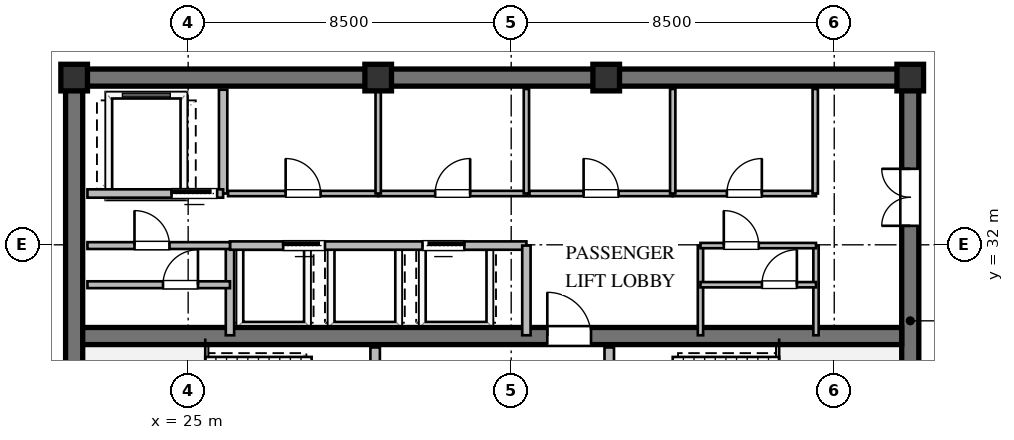
"""IFC4 building model, lengths in metres.
Left out: names, types, materials, properties, quantities, classifications, styles, units other than length and angle.
Written with IfcOpenShell. Run it as: python <this file> out.ifc"""

import sys

from ifc_helpers import new_model, si_unit, direction, frame, frame_2d, origin, origin_2d, place, context, subcontext, project, spatial, rectangle, extrude, element, fill, save


model = new_model("IFC4")
c1 = context("Model", 3, precision=1e-05, world=origin(), true_north=direction((0.0, 1.0)))
c2 = subcontext(c1, "Body", "Model", "MODEL_VIEW")
j1 = project(units=[si_unit("LENGTHUNIT", "METRE"), si_unit("PLANEANGLEUNIT", "RADIAN")], contexts=[c1])
p1 = place(None, origin())
s1 = spatial("IfcSite", under=j1, at=p1, CompositionType="ELEMENT")
p2 = place(p1, origin())
s2 = spatial("IfcBuilding", under=s1, at=p2, CompositionType="ELEMENT")
p3 = place(p2, frame((0.0, 0.0, 266.2)))
s3 = spatial("IfcBuildingStorey", under=s2, at=p3, CompositionType="ELEMENT", Elevation=266.2)
p4 = place(p3, frame((21.775, 36.4, 0.0), z_axis=(0.0, 0.0, 1.0), x_axis=(1.0, 0.0, 0.0)))
e1 = element("IfcWall", 1, at=p4, inside=s3, PredefinedType="SHEAR", context=c2, shape_type="SweptSolid", body=[
    extrude(rectangle(XDim=22.45, YDim=0.45, at=frame_2d((11.225, 0.0))), origin(), (0.0, 0.0, 1.0), 3.56),
])
p5 = place(p3, frame((22.0, 23.825, 0.0), z_axis=(0.0, 0.0, 1.0), x_axis=(0.0, 1.0, 0.0)))
e2 = element("IfcWall", 2, at=p5, inside=s3, PredefinedType="SHEAR", context=c2, shape_type="SweptSolid", body=[
    extrude(rectangle(XDim=12.35, YDim=0.45, at=frame_2d((6.175, 0.0))), origin(), (0.0, 0.0, 1.0), 3.56),
])
p6 = place(p3, frame((44.0, 23.825, 0.0), z_axis=(0.0, 0.0, 1.0), x_axis=(0.0, 1.0, 0.0)))
e3 = element("IfcWall", 3, at=p6, inside=s3, PredefinedType="SHEAR", context=c2, shape_type="SweptSolid", body=[
    extrude(rectangle(XDim=12.35, YDim=0.45, at=frame_2d((6.175, 0.0))), origin(), (0.0, 0.0, 1.0), 3.56),
])
p7 = place(p6, frame((8.675, 0.0, 0.0)))
e4 = element("IfcOpeningElement", 4, at=p7, cuts=e3, PredefinedType="OPENING", context=c2, shape_type="SweptSolid", body=[
    extrude(rectangle(XDim=1.5, YDim=2.15, at=frame_2d((0.75, 1.075))), frame((0.0, 0.235, 0.0), z_axis=(0.0, -1.0, 0.0), x_axis=(1.0, 0.0, 0.0)), (0.0, 0.0, 1.0), 0.47),
])
p8 = place(p3, frame((22.225, 29.6, 0.0), z_axis=(0.0, 0.0, 1.0), x_axis=(1.0, 0.0, 0.0)))
e5 = element("IfcWall", 5, at=p8, inside=s3, PredefinedType="SHEAR", context=c2, shape_type="SweptSolid", body=[
    extrude(rectangle(XDim=21.55, YDim=0.45, at=frame_2d((10.775, 0.0))), origin(), (0.0, 0.0, 1.0), 3.56),
])
p9 = place(p8, frame((12.225, 0.0, 0.0)))
e6 = element("IfcOpeningElement", 6, at=p9, cuts=e5, PredefinedType="OPENING", context=c2, shape_type="SweptSolid", body=[
    extrude(rectangle(XDim=1.15, YDim=2.1, at=frame_2d((0.575, 1.05))), frame((0.0, 0.235, 0.0), z_axis=(0.0, -1.0, 0.0), x_axis=(1.0, 0.0, 0.0)), (0.0, 0.0, 1.0), 0.47),
])
for number, where, z_axis, x_axis in (
    (7, (44.0, 36.4, 0.0), (0.0, 0.0, 1.0), (1.0, 0.0, 0.0)),
    (8, (36.0, 36.4, 0.0), (0.0, 0.0, 1.0), (1.0, 0.0, 0.0)),
    (9, (30.0, 36.4, 0.0), (0.0, 0.0, 1.0), (1.0, 0.0, 0.0)),
    (10, (22.0, 36.4, 0.0), (0.0, 0.0, 1.0), (1.0, 0.0, 0.0)),
):
    element("IfcColumn", number, at=place(p3, frame(where, z_axis=z_axis, x_axis=x_axis)), inside=s3, PredefinedType="COLUMN", context=c2, shape_type="SweptSolid", body=[
        extrude(rectangle(XDim=0.7, YDim=0.7, at=origin_2d()), origin(), (0.0, 0.0, 1.0), 3.8),
    ])
p10 = place(p3, frame((29.92, 23.9, 0.0), z_axis=(0.0, 0.0, 1.0), x_axis=(0.0, 1.0, 0.0)))
e11 = element("IfcWall", 11, at=p10, inside=s3, PredefinedType="SOLIDWALL", context=c2, shape_type="SweptSolid", body=[
    extrude(rectangle(XDim=5.4, YDim=0.25, at=frame_2d((2.7, 0.0))), origin(), (0.0, 0.0, 1.0), 3.006),
])
p11 = place(p10, frame((3.421, 0.0, 0.0)))
e12 = element("IfcOpeningElement", 12, at=p11, cuts=e11, PredefinedType="OPENING", context=c2, shape_type="SweptSolid", body=[
    extrude(rectangle(XDim=1.15, YDim=2.1, at=frame_2d((0.575, 1.05))), frame((0.0, 0.135, 0.0), z_axis=(0.0, -1.0, 0.0), x_axis=(1.0, 0.0, 0.0)), (0.0, 0.0, 1.0), 0.27),
])
p12 = place(p3, frame((36.08, 23.9, 0.0), z_axis=(0.0, 0.0, 1.0), x_axis=(0.0, 1.0, 0.0)))
e13 = element("IfcWall", 13, at=p12, inside=s3, PredefinedType="SOLIDWALL", context=c2, shape_type="SweptSolid", body=[
    extrude(rectangle(XDim=5.4, YDim=0.25, at=frame_2d((2.7, 0.0))), origin(), (0.0, 0.0, 1.0), 3.56),
])
p13 = place(p12, frame((3.421, 0.0, 0.0)))
e14 = element("IfcOpeningElement", 14, at=p13, cuts=e13, PredefinedType="OPENING", context=c2, shape_type="SweptSolid", body=[
    extrude(rectangle(XDim=1.15, YDim=2.1, at=frame_2d((0.575, 1.05))), frame((0.0, 0.135, 0.0), z_axis=(0.0, -1.0, 0.0), x_axis=(1.0, 0.0, 0.0)), (0.0, 0.0, 1.0), 0.27),
])
p14 = place(p3, frame((25.92, 33.35, 0.0), z_axis=(0.0, 0.0, 1.0), x_axis=(0.0, 1.0, 0.0)))
e15 = element("IfcWall", 15, at=p14, inside=s3, PredefinedType="SOLIDWALL", context=c2, shape_type="SweptSolid", body=[
    extrude(rectangle(XDim=2.73, YDim=0.22, at=frame_2d((1.365, 0.0))), origin(), (0.0, 0.0, 1.0), 3.56),
])
p15 = place(p3, frame((22.35, 33.35, 0.0), z_axis=(0.0, 0.0, 1.0), x_axis=(1.0, 0.0, 0.0)))
e16 = element("IfcWall", 16, at=p15, inside=s3, PredefinedType="SOLIDWALL", context=c2, shape_type="SweptSolid", body=[
    extrude(rectangle(XDim=3.57, YDim=0.22, at=frame_2d((1.785, 0.0))), origin(), (0.0, 0.0, 1.0), 3.56),
])
p16 = place(p15, frame((2.213, 0.0, 0.0)))
e17 = element("IfcOpeningElement", 17, at=p16, cuts=e16, PredefinedType="OPENING", context=c2, shape_type="SweptSolid", body=[
    extrude(rectangle(XDim=1.2, YDim=2.1, at=frame_2d((0.6, 1.05))), frame((0.0, 0.12, 0.0), z_axis=(0.0, -1.0, 0.0), x_axis=(1.0, 0.0, 0.0)), (0.0, 0.0, 1.0), 0.24),
])
p17 = place(p3, frame((26.1, 29.62, 0.0), z_axis=(0.0, 0.0, 1.0), x_axis=(0.0, 1.0, 0.0)))
e18 = element("IfcWall", 18, at=p17, inside=s3, PredefinedType="SOLIDWALL", context=c2, shape_type="SweptSolid", body=[
    extrude(rectangle(XDim=2.36, YDim=0.22, at=frame_2d((1.18, 0.0))), origin(), (0.0, 0.0, 1.0), 3.56),
])
p18 = place(p3, frame((26.1, 31.98, 0.0), z_axis=(0.0, 0.0, 1.0), x_axis=(1.0, 0.0, 0.0)))
e19 = element("IfcWall", 19, at=p18, inside=s3, PredefinedType="SOLIDWALL", context=c2, shape_type="SweptSolid", body=[
    extrude(rectangle(XDim=7.8, YDim=0.22, at=frame_2d((3.9, 0.0))), origin(), (0.0, 0.0, 1.0), 3.56),
])
p19 = place(p18, frame((1.4, 0.0, 0.0)))
e20 = element("IfcOpeningElement", 20, at=p19, cuts=e19, PredefinedType="OPENING", context=c2, shape_type="SweptSolid", body=[
    extrude(rectangle(XDim=1.1, YDim=2.1, at=frame_2d((0.55, 1.05))), frame((0.0, 0.12, 0.0), z_axis=(0.0, -1.0, 0.0), x_axis=(1.0, 0.0, 0.0)), (0.0, 0.0, 1.0), 0.24),
])
p20 = place(p18, frame((5.066, 0.0, 0.0)))
e21 = element("IfcOpeningElement", 21, at=p20, cuts=e19, PredefinedType="OPENING", context=c2, shape_type="SweptSolid", body=[
    extrude(rectangle(XDim=1.1, YDim=2.1, at=frame_2d((0.55, 1.05))), frame((0.0, 0.12, 0.0), z_axis=(0.0, -1.0, 0.0), x_axis=(1.0, 0.0, 0.0)), (0.0, 0.0, 1.0), 0.24),
])
p21 = place(p3, frame((33.9, 29.62, 0.0), z_axis=(0.0, 0.0, 1.0), x_axis=(0.0, 1.0, 0.0)))
e22 = element("IfcWall", 22, at=p21, inside=s3, PredefinedType="SOLIDWALL", context=c2, shape_type="SweptSolid", body=[
    extrude(rectangle(XDim=2.36, YDim=0.22, at=frame_2d((1.18, 0.0))), origin(), (0.0, 0.0, 1.0), 3.56),
])
p22 = place(p3, frame((26.05, 33.35, 0.0), z_axis=(0.0, 0.0, 1.0), x_axis=(1.0, 0.0, 0.0)))
e23 = element("IfcWall", 23, at=p22, inside=s3, PredefinedType="PARTITIONING", context=c2, shape_type="SweptSolid", body=[
    extrude(rectangle(XDim=3.95, YDim=0.14, at=frame_2d((1.975, 0.0))), origin(), (0.0, 0.0, 1.0), 3.56),
])
p23 = place(p22, frame((1.515, 0.0, 0.0)))
e24 = element("IfcOpeningElement", 24, at=p23, cuts=e23, PredefinedType="OPENING", context=c2, shape_type="SweptSolid", body=[
    extrude(rectangle(XDim=0.92, YDim=2.1, at=frame_2d((0.46, 1.05))), frame((0.0, 0.08, 0.0), z_axis=(0.0, -1.0, 0.0), x_axis=(1.0, 0.0, 0.0)), (0.0, 0.0, 1.0), 0.16),
])
p24 = place(p3, frame((30.0, 33.35, 0.0), z_axis=(0.0, 0.0, 1.0), x_axis=(1.0, 0.0, 0.0)))
e25 = element("IfcWall", 25, at=p24, inside=s3, PredefinedType="PARTITIONING", context=c2, shape_type="SweptSolid", body=[
    extrude(rectangle(XDim=3.92, YDim=0.14, at=frame_2d((1.96, 0.0))), origin(), (0.0, 0.0, 1.0), 3.56),
])
p25 = place(p24, frame((1.5, 0.0, 0.0)))
e26 = element("IfcOpeningElement", 26, at=p25, cuts=e25, PredefinedType="OPENING", context=c2, shape_type="SweptSolid", body=[
    extrude(rectangle(XDim=0.92, YDim=2.1, at=frame_2d((0.46, 1.05))), frame((0.0, 0.08, 0.0), z_axis=(0.0, -1.0, 0.0), x_axis=(1.0, 0.0, 0.0)), (0.0, 0.0, 1.0), 0.16),
])
for number, where, z_axis, x_axis in (
    (27, (30.0, 33.35, 0.0), (0.0, 0.0, 1.0), (0.0, 1.0, 0.0)),
    (28, (33.9, 33.35, 0.0), (0.0, 0.0, 1.0), (0.0, 1.0, 0.0)),
):
    element("IfcWall", number, at=place(p3, frame(where, z_axis=z_axis, x_axis=x_axis)), inside=s3, PredefinedType="PARTITIONING", context=c2, shape_type="SweptSolid", body=[
        extrude(rectangle(XDim=2.75, YDim=0.14, at=frame_2d((1.375, 0.0))), origin(), (0.0, 0.0, 1.0), 3.56),
    ])
p26 = place(p3, frame((33.98, 33.35, 0.0), z_axis=(0.0, 0.0, 1.0), x_axis=(1.0, 0.0, 0.0)))
e29 = element("IfcWall", 29, at=p26, inside=s3, PredefinedType="PARTITIONING", context=c2, shape_type="SweptSolid", body=[
    extrude(rectangle(XDim=3.77, YDim=0.14, at=frame_2d((1.885, 0.0))), origin(), (0.0, 0.0, 1.0), 3.56),
])
p27 = place(p26, frame((1.425, 0.0, 0.0)))
e30 = element("IfcOpeningElement", 30, at=p27, cuts=e29, PredefinedType="OPENING", context=c2, shape_type="SweptSolid", body=[
    extrude(rectangle(XDim=0.92, YDim=2.1, at=frame_2d((0.46, 1.05))), frame((0.0, 0.08, 0.0), z_axis=(0.0, -1.0, 0.0), x_axis=(1.0, 0.0, 0.0)), (0.0, 0.0, 1.0), 0.16),
])
p28 = place(p3, frame((37.75, 33.35, 0.0), z_axis=(0.0, 0.0, 1.0), x_axis=(1.0, 0.0, 0.0)))
e31 = element("IfcWall", 31, at=p28, inside=s3, PredefinedType="PARTITIONING", context=c2, shape_type="SweptSolid", body=[
    extrude(rectangle(XDim=3.77, YDim=0.14, at=frame_2d((1.885, 0.0))), origin(), (0.0, 0.0, 1.0), 3.56),
])
p29 = place(p28, frame((1.425, 0.0, 0.0)))
e32 = element("IfcOpeningElement", 32, at=p29, cuts=e31, PredefinedType="OPENING", context=c2, shape_type="SweptSolid", body=[
    extrude(rectangle(XDim=0.92, YDim=2.1, at=frame_2d((0.46, 1.05))), frame((0.0, 0.08, 0.0), z_axis=(0.0, -1.0, 0.0), x_axis=(1.0, 0.0, 0.0)), (0.0, 0.0, 1.0), 0.16),
])
for number, where, z_axis, x_axis in (
    (33, (37.75, 33.35, 0.0), (0.0, 0.0, 1.0), (0.0, 1.0, 0.0)),
    (34, (41.5, 33.35, 0.0), (0.0, 0.0, 1.0), (0.0, 1.0, 0.0)),
):
    element("IfcWall", number, at=place(p3, frame(where, z_axis=z_axis, x_axis=x_axis)), inside=s3, PredefinedType="PARTITIONING", context=c2, shape_type="SweptSolid", body=[
        extrude(rectangle(XDim=2.75, YDim=0.14, at=frame_2d((1.375, 0.0))), origin(), (0.0, 0.0, 1.0), 3.56),
    ])
p30 = place(p3, frame((22.35, 30.95, 0.0), z_axis=(0.0, 0.0, 1.0), x_axis=(1.0, 0.0, 0.0)))
e35 = element("IfcWall", 35, at=p30, inside=s3, PredefinedType="PARTITIONING", context=c2, shape_type="SweptSolid", body=[
    extrude(rectangle(XDim=3.75, YDim=0.18, at=frame_2d((1.875, 0.0))), origin(), (0.0, 0.0, 1.0), 3.56),
])
p31 = place(p30, frame((1.988, 0.0, 0.0)))
e36 = element("IfcOpeningElement", 36, at=p31, cuts=e35, PredefinedType="OPENING", context=c2, shape_type="SweptSolid", body=[
    extrude(rectangle(XDim=0.92, YDim=2.1, at=frame_2d((0.46, 1.05))), frame((0.0, 0.1, 0.0), z_axis=(0.0, -1.0, 0.0), x_axis=(1.0, 0.0, 0.0)), (0.0, 0.0, 1.0), 0.2),
])
p32 = place(p3, frame((22.35, 31.98, 0.0), z_axis=(0.0, 0.0, 1.0), x_axis=(1.0, 0.0, 0.0)))
e37 = element("IfcWall", 37, at=p32, inside=s3, PredefinedType="PARTITIONING", context=c2, shape_type="SweptSolid", body=[
    extrude(rectangle(XDim=3.75, YDim=0.18, at=frame_2d((1.875, 0.0))), origin(), (0.0, 0.0, 1.0), 3.56),
])
p33 = place(p32, frame((1.238, 0.0, 0.0)))
e38 = element("IfcOpeningElement", 38, at=p33, cuts=e37, PredefinedType="OPENING", context=c2, shape_type="SweptSolid", body=[
    extrude(rectangle(XDim=0.92, YDim=2.1, at=frame_2d((0.46, 1.05))), frame((0.0, 0.1, 0.0), z_axis=(0.0, -1.0, 0.0), x_axis=(1.0, 0.0, 0.0)), (0.0, 0.0, 1.0), 0.2),
])
for number, where, z_axis, x_axis in (
    (39, (38.48, 29.62, 0.0), (0.0, 0.0, 1.0), (0.0, 1.0, 0.0)),
    (40, (41.52, 29.62, 0.0), (0.0, 0.0, 1.0), (0.0, 1.0, 0.0)),
):
    element("IfcWall", number, at=place(p3, frame(where, z_axis=z_axis, x_axis=x_axis)), inside=s3, PredefinedType="PARTITIONING", context=c2, shape_type="SweptSolid", body=[
        extrude(rectangle(XDim=2.36, YDim=0.14, at=frame_2d((1.18, 0.0))), origin(), (0.0, 0.0, 1.0), 3.56),
    ])
p34 = place(p3, frame((38.48, 30.95, 0.0), z_axis=(0.0, 0.0, 1.0), x_axis=(1.0, 0.0, 0.0)))
e41 = element("IfcWall", 41, at=p34, inside=s3, PredefinedType="PARTITIONING", context=c2, shape_type="SweptSolid", body=[
    extrude(rectangle(XDim=3.04, YDim=0.14, at=frame_2d((1.52, 0.0))), origin(), (0.0, 0.0, 1.0), 3.56),
])
p35 = place(p34, frame((1.617, 0.0, 0.0)))
e42 = element("IfcOpeningElement", 42, at=p35, cuts=e41, PredefinedType="OPENING", context=c2, shape_type="SweptSolid", body=[
    extrude(rectangle(XDim=0.92, YDim=2.1, at=frame_2d((0.46, 1.05))), frame((0.0, 0.08, 0.0), z_axis=(0.0, -1.0, 0.0), x_axis=(1.0, 0.0, 0.0)), (0.0, 0.0, 1.0), 0.16),
])
p36 = place(p3, frame((38.48, 31.98, 0.0), z_axis=(0.0, 0.0, 1.0), x_axis=(1.0, 0.0, 0.0)))
e43 = element("IfcWall", 43, at=p36, inside=s3, PredefinedType="PARTITIONING", context=c2, shape_type="SweptSolid", body=[
    extrude(rectangle(XDim=3.04, YDim=0.14, at=frame_2d((1.52, 0.0))), origin(), (0.0, 0.0, 1.0), 3.56),
])
p37 = place(p36, frame((0.614, 0.0, 0.0)))
e44 = element("IfcOpeningElement", 44, at=p37, cuts=e43, PredefinedType="OPENING", context=c2, shape_type="SweptSolid", body=[
    extrude(rectangle(XDim=0.92, YDim=2.1, at=frame_2d((0.46, 1.05))), frame((0.0, 0.08, 0.0), z_axis=(0.0, -1.0, 0.0), x_axis=(1.0, 0.0, 0.0)), (0.0, 0.0, 1.0), 0.16),
])
p38 = place(p9, origin())
e45 = element("IfcDoor", 45, at=p38, inside=s3, OperationType="SINGLE_SWING_LEFT", PredefinedType="DOOR", context=c2, shape_type="SweptSolid", body=[
    extrude(rectangle(XDim=1.15, YDim=2.1, at=frame_2d((0.575, 1.05))), frame((0.0, 0.025, 0.0), z_axis=(0.0, -1.0, 0.0), x_axis=(1.0, 0.0, 0.0)), (0.0, 0.0, 1.0), 0.05),
])
fill(e6, e45)
p39 = place(p7, origin())
e46 = element("IfcDoor", 46, at=p39, inside=s3, OperationType="DOUBLE_DOOR_SINGLE_SWING", PredefinedType="DOOR", context=c2, shape_type="SweptSolid", body=[
    extrude(rectangle(XDim=1.5, YDim=2.15, at=frame_2d((0.75, 1.075))), frame((0.0, 0.025, 0.0), z_axis=(0.0, -1.0, 0.0), x_axis=(1.0, 0.0, 0.0)), (0.0, 0.0, 1.0), 0.05),
])
fill(e4, e46)
p40 = place(p16, origin())
e47 = element("IfcDoor", 47, at=p40, inside=s3, OperationType="SLIDING_TO_LEFT", PredefinedType="DOOR", context=c2, shape_type="SweptSolid", body=[
    extrude(rectangle(XDim=1.2, YDim=2.1, at=frame_2d((0.6, 1.05))), frame((0.0, 0.025, 0.0), z_axis=(0.0, -1.0, 0.0), x_axis=(1.0, 0.0, 0.0)), (0.0, 0.0, 1.0), 0.05),
])
fill(e17, e47)
p41 = place(p19, origin())
e48 = element("IfcDoor", 48, at=p41, inside=s3, OperationType="SLIDING_TO_LEFT", PredefinedType="DOOR", context=c2, shape_type="SweptSolid", body=[
    extrude(rectangle(XDim=1.1, YDim=2.1, at=frame_2d((0.55, 1.05))), frame((0.0, 0.025, 0.0), z_axis=(0.0, -1.0, 0.0), x_axis=(1.0, 0.0, 0.0)), (0.0, 0.0, 1.0), 0.05),
])
fill(e20, e48)
p42 = place(p20, origin())
e49 = element("IfcDoor", 49, at=p42, inside=s3, OperationType="SLIDING_TO_RIGHT", PredefinedType="DOOR", context=c2, shape_type="SweptSolid", body=[
    extrude(rectangle(XDim=1.1, YDim=2.1, at=frame_2d((0.55, 1.05))), frame((0.0, 0.025, 0.0), z_axis=(0.0, -1.0, 0.0), x_axis=(1.0, 0.0, 0.0)), (0.0, 0.0, 1.0), 0.05),
])
fill(e21, e49)
p43 = place(p23, origin())
e50 = element("IfcDoor", 50, at=p43, inside=s3, OperationType="SINGLE_SWING_LEFT", PredefinedType="DOOR", context=c2, shape_type="SweptSolid", body=[
    extrude(rectangle(XDim=0.92, YDim=2.1, at=frame_2d((0.46, 1.05))), frame((0.0, 0.025, 0.0), z_axis=(0.0, -1.0, 0.0), x_axis=(1.0, 0.0, 0.0)), (0.0, 0.0, 1.0), 0.05),
])
fill(e24, e50)
p44 = place(p25, origin())
e51 = element("IfcDoor", 51, at=p44, inside=s3, OperationType="SINGLE_SWING_RIGHT", PredefinedType="DOOR", context=c2, shape_type="SweptSolid", body=[
    extrude(rectangle(XDim=0.92, YDim=2.1, at=frame_2d((0.46, 1.05))), frame((0.0, 0.025, 0.0), z_axis=(0.0, -1.0, 0.0), x_axis=(1.0, 0.0, 0.0)), (0.0, 0.0, 1.0), 0.05),
])
fill(e26, e51)
p45 = place(p27, origin())
e52 = element("IfcDoor", 52, at=p45, inside=s3, OperationType="SINGLE_SWING_LEFT", PredefinedType="DOOR", context=c2, shape_type="SweptSolid", body=[
    extrude(rectangle(XDim=0.92, YDim=2.1, at=frame_2d((0.46, 1.05))), frame((0.0, 0.025, 0.0), z_axis=(0.0, -1.0, 0.0), x_axis=(1.0, 0.0, 0.0)), (0.0, 0.0, 1.0), 0.05),
])
fill(e30, e52)
p46 = place(p29, origin())
e53 = element("IfcDoor", 53, at=p46, inside=s3, OperationType="SINGLE_SWING_RIGHT", PredefinedType="DOOR", context=c2, shape_type="SweptSolid", body=[
    extrude(rectangle(XDim=0.92, YDim=2.1, at=frame_2d((0.46, 1.05))), frame((0.0, 0.025, 0.0), z_axis=(0.0, -1.0, 0.0), x_axis=(1.0, 0.0, 0.0)), (0.0, 0.0, 1.0), 0.05),
])
fill(e32, e53)
p47 = place(p33, origin())
e54 = element("IfcDoor", 54, at=p47, inside=s3, OperationType="SINGLE_SWING_LEFT", PredefinedType="DOOR", context=c2, shape_type="SweptSolid", body=[
    extrude(rectangle(XDim=0.92, YDim=2.1, at=frame_2d((0.46, 1.05))), frame((0.0, 0.025, 0.0), z_axis=(0.0, -1.0, 0.0), x_axis=(1.0, 0.0, 0.0)), (0.0, 0.0, 1.0), 0.05),
])
fill(e38, e54)
p48 = place(p31, origin())
e55 = element("IfcDoor", 55, at=p48, inside=s3, OperationType="SINGLE_SWING_RIGHT", PredefinedType="DOOR", context=c2, shape_type="SweptSolid", body=[
    extrude(rectangle(XDim=0.92, YDim=2.1, at=frame_2d((0.46, 1.05))), frame((0.0, 0.025, 0.0), z_axis=(0.0, -1.0, 0.0), x_axis=(1.0, 0.0, 0.0)), (0.0, 0.0, 1.0), 0.05),
])
fill(e36, e55)
p49 = place(p37, origin())
e56 = element("IfcDoor", 56, at=p49, inside=s3, OperationType="SINGLE_SWING_LEFT", PredefinedType="DOOR", context=c2, shape_type="SweptSolid", body=[
    extrude(rectangle(XDim=0.92, YDim=2.1, at=frame_2d((0.46, 1.05))), frame((0.0, 0.025, 0.0), z_axis=(0.0, -1.0, 0.0), x_axis=(1.0, 0.0, 0.0)), (0.0, 0.0, 1.0), 0.05),
])
fill(e44, e56)
p50 = place(p35, origin())
e57 = element("IfcDoor", 57, at=p50, inside=s3, OperationType="SINGLE_SWING_RIGHT", PredefinedType="DOOR", context=c2, shape_type="SweptSolid", body=[
    extrude(rectangle(XDim=0.92, YDim=2.1, at=frame_2d((0.46, 1.05))), frame((0.0, 0.025, 0.0), z_axis=(0.0, -1.0, 0.0), x_axis=(1.0, 0.0, 0.0)), (0.0, 0.0, 1.0), 0.05),
])
fill(e42, e57)
save(model, sys.argv[1])
